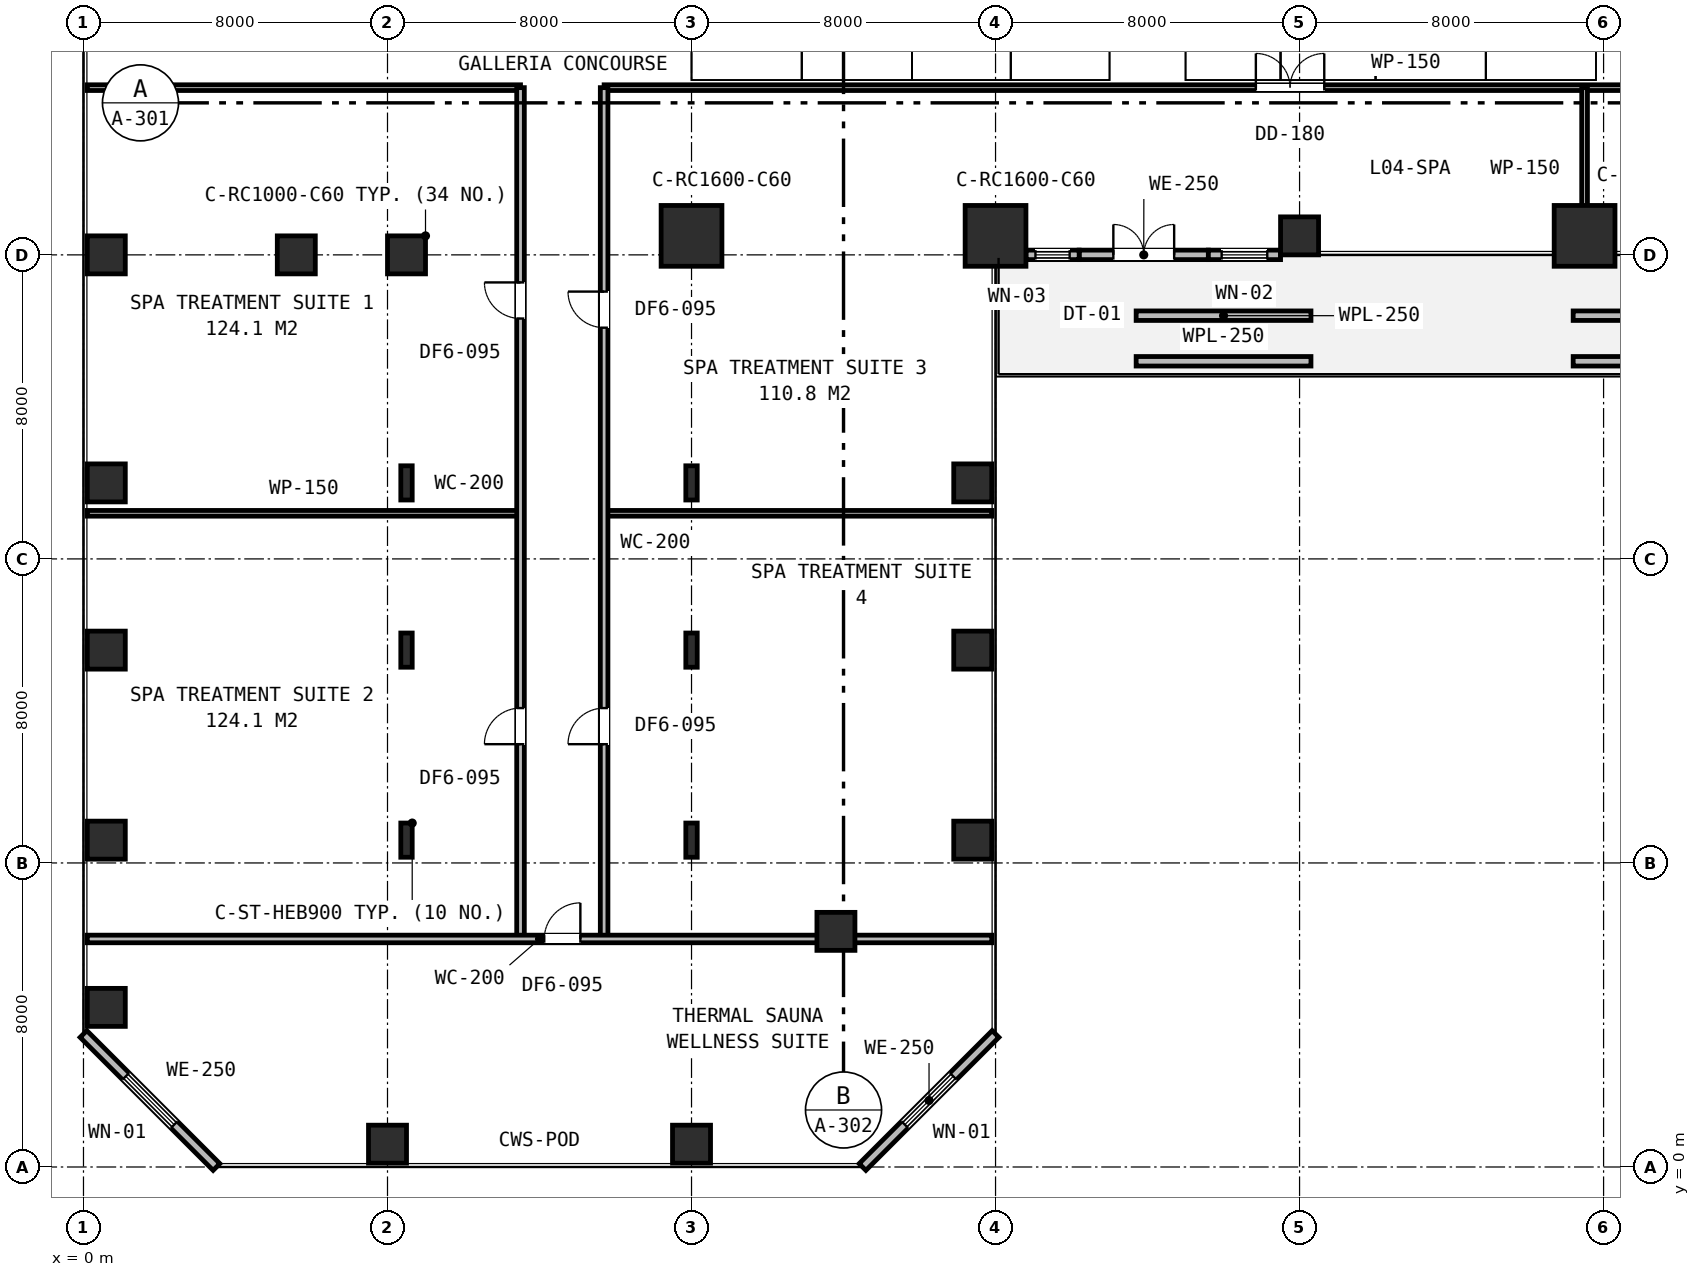
"""IFC4 building model, lengths in metres.
Left out: names, types, materials, properties, quantities, classifications, styles, units other than length and angle.
Written with IfcOpenShell. Run it as: python <this file> out.ifc"""

import sys

from ifc_helpers import new_model, si_unit, direction, frame, frame_2d, origin, origin_2d, place, context, subcontext, project, spatial, rectangle, i_section, extrude, element, fill, save


model = new_model("IFC4")
c1 = context("Model", 3, precision=1e-05, world=origin(), true_north=direction((0.0, 1.0)))
c2 = subcontext(c1, "Body", "Model", "MODEL_VIEW")
j1 = project(units=[si_unit("LENGTHUNIT", "METRE"), si_unit("PLANEANGLEUNIT", "RADIAN")], contexts=[c1])
p1 = place(None, origin())
s1 = spatial("IfcSite", under=j1, at=p1, CompositionType="ELEMENT")
p2 = place(p1, origin())
s2 = spatial("IfcBuilding", under=s1, at=p2, CompositionType="ELEMENT")
p3 = place(p2, frame((0.0, 0.0, 21.3)))
s3 = spatial("IfcBuildingStorey", under=s2, at=p3, CompositionType="ELEMENT", Elevation=21.3)
p4 = place(p3, frame((8.5, 24.0, 0.0), z_axis=(0.0, 0.0, 1.0), x_axis=(1.0, 0.0, 0.0)))
e1 = element("IfcColumn", 1, at=p4, inside=s3, PredefinedType="COLUMN", context=c2, shape_type="SweptSolid", body=[
    extrude(rectangle(XDim=1.0, YDim=1.0, at=origin_2d()), origin(), (0.0, 0.0, 1.0), 4.5),
])
for number, where, z_axis, x_axis in (
    (2, (16.0, 24.5, 0.0), (0.0, 0.0, 1.0), (1.0, 0.0, 0.0)),
    (3, (24.0, 24.5, 0.0), (0.0, 0.0, 1.0), (1.0, 0.0, 0.0)),
):
    element("IfcColumn", number, at=place(p3, frame(where, z_axis=z_axis, x_axis=x_axis)), inside=s3, PredefinedType="COLUMN", context=c2, shape_type="SweptSolid", body=[
        extrude(rectangle(XDim=1.6, YDim=1.6, at=origin_2d()), origin(), (0.0, 0.0, 1.0), 4.5),
    ])
p5 = place(p3, frame((32.0, 24.5, 0.0), z_axis=(0.0, 0.0, 1.0), x_axis=(1.0, 0.0, 0.0)))
e4 = element("IfcColumn", 4, at=p5, inside=s3, PredefinedType="COLUMN", context=c2, shape_type="SweptSolid", body=[
    extrude(rectangle(XDim=1.0, YDim=1.0, at=origin_2d()), origin(), (0.0, 0.0, 1.0), 4.5),
])
p6 = place(p3, frame((39.5, 24.5, 0.0), z_axis=(0.0, 0.0, 1.0), x_axis=(1.0, 0.0, 0.0)))
e5 = element("IfcColumn", 5, at=p6, inside=s3, PredefinedType="COLUMN", context=c2, shape_type="SweptSolid", body=[
    extrude(rectangle(XDim=1.6, YDim=1.6, at=origin_2d()), origin(), (0.0, 0.0, 1.0), 4.5),
])
for number, where, z_axis, x_axis in (
    (6, (5.6, 24.0, 0.0), (0.0, 0.0, 1.0), (1.0, 0.0, 0.0)),
    (7, (0.6, 24.0, 0.0), (0.0, 0.0, 1.0), (1.0, 0.0, 0.0)),
    (8, (0.6, 8.6, 0.0), (0.0, 0.0, 1.0), (1.0, 0.0, 0.0)),
    (9, (0.6, 13.6, 0.0), (0.0, 0.0, 1.0), (1.0, 0.0, 0.0)),
    (10, (0.6, 18.0, 0.0), (0.0, 0.0, 1.0), (1.0, 0.0, 0.0)),
    (11, (0.6, 4.2, 0.0), (0.0, 0.0, 1.0), (1.0, 0.0, 0.0)),
    (12, (8.0, 0.6, 0.0), (0.0, 0.0, 1.0), (1.0, 0.0, 0.0)),
    (13, (16.0, 0.6, 0.0), (0.0, 0.0, 1.0), (1.0, 0.0, 0.0)),
    (14, (19.8, 6.2, 0.0), (0.0, 0.0, 1.0), (1.0, 0.0, 0.0)),
    (15, (23.4, 8.6, 0.0), (0.0, 0.0, 1.0), (1.0, 0.0, 0.0)),
    (16, (23.4, 13.6, 0.0), (0.0, 0.0, 1.0), (1.0, 0.0, 0.0)),
    (17, (23.4, 18.0, 0.0), (0.0, 0.0, 1.0), (1.0, 0.0, 0.0)),
):
    element("IfcColumn", number, at=place(p3, frame(where, z_axis=z_axis, x_axis=x_axis)), inside=s3, PredefinedType="COLUMN", context=c2, shape_type="SweptSolid", body=[
        extrude(rectangle(XDim=1.0, YDim=1.0, at=origin_2d()), origin(), (0.0, 0.0, 1.0), 4.5),
    ])
for number, where, z_axis, x_axis in (
    (18, (8.5, 8.6, 0.0), (0.0, 0.0, 1.0), (1.0, 0.0, 0.0)),
    (19, (16.0, 8.6, 0.0), (0.0, 0.0, 1.0), (1.0, 0.0, 0.0)),
    (20, (8.5, 13.6, 0.0), (0.0, 0.0, 1.0), (1.0, 0.0, 0.0)),
    (21, (16.0, 13.6, 0.0), (0.0, 0.0, 1.0), (1.0, 0.0, 0.0)),
    (22, (8.5, 18.0, 0.0), (0.0, 0.0, 1.0), (1.0, 0.0, 0.0)),
    (23, (16.0, 18.0, 0.0), (0.0, 0.0, 1.0), (1.0, 0.0, 0.0)),
):
    element("IfcColumn", number, at=place(p3, frame(where, z_axis=z_axis, x_axis=x_axis)), inside=s3, PredefinedType="COLUMN", context=c2, shape_type="SweptSolid", body=[
        extrude(i_section(OverallWidth=0.3, OverallDepth=0.9, WebThickness=0.018, FlangeThickness=0.035, FilletRadius=0.03, at=origin_2d()), origin(), (0.0, 0.0, 1.0), 4.5),
    ])
for number, where, z_axis, x_axis in (
    (24, (27.7, 21.2, -0.02), (0.0, 0.0, 1.0), (1.0, 0.0, 0.0)),
    (25, (27.7, 22.4, -0.02), (0.0, 0.0, 1.0), (1.0, 0.0, 0.0)),
    (26, (39.2, 21.2, -0.02), (0.0, 0.0, 1.0), (1.0, 0.0, 0.0)),
    (27, (39.2, 22.4, -0.02), (0.0, 0.0, 1.0), (1.0, 0.0, 0.0)),
):
    element("IfcWall", number, at=place(p3, frame(where, z_axis=z_axis, x_axis=x_axis)), inside=s3, PredefinedType="USERDEFINED", context=c2, shape_type="SweptSolid", body=[
        extrude(rectangle(XDim=4.6, YDim=0.25, at=frame_2d((2.3, 0.0))), origin(), (0.0, 0.0, 1.0), 0.55),
    ])
p7 = place(p3, frame((20.5, 0.0, 0.0), z_axis=(0.0, 0.0, 1.0), x_axis=(0.707106781187, 0.707106781187, 0.0)))
e28 = element("IfcWall", 28, at=p7, inside=s3, PredefinedType="STANDARD", context=c2, shape_type="SweptSolid", body=[
    extrude(rectangle(XDim=4.95, YDim=0.25, at=frame_2d((2.475, 0.0))), origin(), (0.0, 0.0, 1.0), 4.23),
])
p8 = place(p7, frame((1.575, 0.0, 0.75)))
e29 = element("IfcOpeningElement", 29, at=p8, cuts=e28, PredefinedType="OPENING", context=c2, shape_type="SweptSolid", body=[
    extrude(rectangle(XDim=1.8, YDim=1.85, at=frame_2d((0.9, 0.925))), frame((0.0, 0.135, 0.0), z_axis=(0.0, -1.0, 0.0), x_axis=(1.0, 0.0, 0.0)), (0.0, 0.0, 1.0), 0.27),
])
p9 = place(p3, frame((26.2, 24.0, 0.0), z_axis=(0.0, 0.0, 1.0), x_axis=(1.0, 0.0, 0.0)))
e30 = element("IfcWall", 30, at=p9, inside=s3, PredefinedType="STANDARD", context=c2, shape_type="SweptSolid", body=[
    extrude(rectangle(XDim=3.4, YDim=0.25, at=frame_2d((1.7, 0.0))), origin(), (0.0, 0.0, 1.0), 3.77),
])
p10 = place(p9, frame((0.9, 0.0, 0.0)))
e31 = element("IfcOpeningElement", 31, at=p10, cuts=e30, PredefinedType="OPENING", context=c2, shape_type="SweptSolid", body=[
    extrude(rectangle(XDim=1.6, YDim=2.2, at=frame_2d((0.8, 1.1))), frame((0.0, 0.135, 0.0), z_axis=(0.0, -1.0, 0.0), x_axis=(1.0, 0.0, 0.0)), (0.0, 0.0, 1.0), 0.27),
])
p11 = place(p3, frame((24.8, 24.0, 0.0), z_axis=(0.0, 0.0, 1.0), x_axis=(1.0, 0.0, 0.0)))
e32 = element("IfcWall", 32, at=p11, inside=s3, PredefinedType="STANDARD", context=c2, shape_type="SweptSolid", body=[
    extrude(rectangle(XDim=1.4, YDim=0.25, at=frame_2d((0.7, 0.0))), origin(), (0.0, 0.0, 1.0), 3.77),
])
p12 = place(p11, frame((0.25, 0.0, 0.9)))
e33 = element("IfcOpeningElement", 33, at=p12, cuts=e32, PredefinedType="OPENING", context=c2, shape_type="SweptSolid", body=[
    extrude(rectangle(XDim=0.9, YDim=1.55, at=frame_2d((0.45, 0.775))), frame((0.0, 0.135, 0.0), z_axis=(0.0, -1.0, 0.0), x_axis=(1.0, 0.0, 0.0)), (0.0, 0.0, 1.0), 0.27),
])
p13 = place(p3, frame((29.6, 24.0, 0.0), z_axis=(0.0, 0.0, 1.0), x_axis=(1.0, 0.0, 0.0)))
e34 = element("IfcWall", 34, at=p13, inside=s3, PredefinedType="STANDARD", context=c2, shape_type="SweptSolid", body=[
    extrude(rectangle(XDim=1.9, YDim=0.25, at=frame_2d((0.95, 0.0))), origin(), (0.0, 0.0, 1.0), 3.77),
])
p14 = place(p13, frame((0.35, 0.0, 0.85)))
e35 = element("IfcOpeningElement", 35, at=p14, cuts=e34, PredefinedType="OPENING", context=c2, shape_type="SweptSolid", body=[
    extrude(rectangle(XDim=1.2, YDim=1.6, at=frame_2d((0.6, 0.8))), frame((0.0, 0.135, 0.0), z_axis=(0.0, -1.0, 0.0), x_axis=(1.0, 0.0, 0.0)), (0.0, 0.0, 1.0), 0.27),
])
p15 = place(p3, frame((0.0, 3.5, 0.0), z_axis=(0.0, 0.0, 1.0), x_axis=(0.707106781187, -0.707106781187, 0.0)))
e36 = element("IfcWall", 36, at=p15, inside=s3, PredefinedType="STANDARD", context=c2, shape_type="SweptSolid", body=[
    extrude(rectangle(XDim=4.95, YDim=0.25, at=frame_2d((2.475, 0.0))), origin(), (0.0, 0.0, 1.0), 4.23),
])
p16 = place(p15, frame((1.575, 0.0, 0.75)))
e37 = element("IfcOpeningElement", 37, at=p16, cuts=e36, PredefinedType="OPENING", context=c2, shape_type="SweptSolid", body=[
    extrude(rectangle(XDim=1.8, YDim=1.85, at=frame_2d((0.9, 0.925))), frame((0.0, 0.135, 0.0), z_axis=(0.0, -1.0, 0.0), x_axis=(1.0, 0.0, 0.0)), (0.0, 0.0, 1.0), 0.27),
])
p17 = place(p3, frame((13.7, 28.4, 0.0), z_axis=(0.0, 0.0, 1.0), x_axis=(1.0, 0.0, 0.0)))
e38 = element("IfcWall", 38, at=p17, inside=s3, PredefinedType="PARTITIONING", context=c2, shape_type="SweptSolid", body=[
    extrude(rectangle(XDim=42.2, YDim=0.15, at=frame_2d((21.1, 0.0))), origin(), (0.0, 0.0, 1.0), 3.58),
])
p18 = place(p17, frame((17.15, 0.0, 0.0)))
e39 = element("IfcOpeningElement", 39, at=p18, cuts=e38, PredefinedType="OPENING", context=c2, shape_type="SweptSolid", body=[
    extrude(rectangle(XDim=1.8, YDim=2.15, at=frame_2d((0.9, 1.075))), frame((0.0, 0.085, 0.0), z_axis=(0.0, -1.0, 0.0), x_axis=(1.0, 0.0, 0.0)), (0.0, 0.0, 1.0), 0.17),
])
p19 = place(p17, frame((33.525, 0.0, 0.0)))
e40 = element("IfcOpeningElement", 40, at=p19, cuts=e38, PredefinedType="OPENING", context=c2, shape_type="SweptSolid", body=[
    extrude(rectangle(XDim=0.95, YDim=2.15, at=frame_2d((0.475, 1.075))), frame((0.0, 0.085, 0.0), z_axis=(0.0, -1.0, 0.0), x_axis=(1.0, 0.0, 0.0)), (0.0, 0.0, 1.0), 0.17),
])
p20 = place(p3, frame((39.5, 24.1, 0.0), z_axis=(0.0, 0.0, 1.0), x_axis=(0.0, 1.0, 0.0)))
e41 = element("IfcWall", 41, at=p20, inside=s3, PredefinedType="PARTITIONING", context=c2, shape_type="SweptSolid", body=[
    extrude(rectangle(XDim=4.3, YDim=0.15, at=frame_2d((2.15, 0.0))), origin(), (0.0, 0.0, 1.0), 3.58),
])
for number, where, z_axis, x_axis in (
    (42, (0.1, 28.4, 0.0), (0.0, 0.0, 1.0), (1.0, 0.0, 0.0)),
    (43, (0.1, 17.2, 0.0), (0.0, 0.0, 1.0), (1.0, 0.0, 0.0)),
):
    element("IfcWall", number, at=place(p3, frame(where, z_axis=z_axis, x_axis=x_axis)), inside=s3, PredefinedType="PARTITIONING", context=c2, shape_type="SweptSolid", body=[
        extrude(rectangle(XDim=11.4, YDim=0.15, at=frame_2d((5.7, 0.0))), origin(), (0.0, 0.0, 1.0), 3.58),
    ])
p21 = place(p3, frame((13.7, 17.2, 0.0), z_axis=(0.0, 0.0, 1.0), x_axis=(1.0, 0.0, 0.0)))
e44 = element("IfcWall", 44, at=p21, inside=s3, PredefinedType="PARTITIONING", context=c2, shape_type="SweptSolid", body=[
    extrude(rectangle(XDim=10.2, YDim=0.15, at=frame_2d((5.1, 0.0))), origin(), (0.0, 0.0, 1.0), 3.58),
])
p22 = place(p3, frame((11.5, 6.0, 0.0), z_axis=(0.0, 0.0, 1.0), x_axis=(0.0, 1.0, 0.0)))
e45 = element("IfcWall", 45, at=p22, inside=s3, PredefinedType="PARTITIONING", context=c2, shape_type="SweptSolid", body=[
    extrude(rectangle(XDim=22.4, YDim=0.2, at=frame_2d((11.2, 0.0))), origin(), (0.0, 0.0, 1.0), 3.58),
])
p23 = place(p22, frame((16.325, 0.0, 0.0)))
e46 = element("IfcOpeningElement", 46, at=p23, cuts=e45, PredefinedType="OPENING", context=c2, shape_type="SweptSolid", body=[
    extrude(rectangle(XDim=0.95, YDim=2.15, at=frame_2d((0.475, 1.075))), frame((0.0, 0.11, 0.0), z_axis=(0.0, -1.0, 0.0), x_axis=(1.0, 0.0, 0.0)), (0.0, 0.0, 1.0), 0.22),
])
p24 = place(p22, frame((5.125, 0.0, 0.0)))
e47 = element("IfcOpeningElement", 47, at=p24, cuts=e45, PredefinedType="OPENING", context=c2, shape_type="SweptSolid", body=[
    extrude(rectangle(XDim=0.95, YDim=2.15, at=frame_2d((0.475, 1.075))), frame((0.0, 0.11, 0.0), z_axis=(0.0, -1.0, 0.0), x_axis=(1.0, 0.0, 0.0)), (0.0, 0.0, 1.0), 0.22),
])
p25 = place(p3, frame((13.7, 6.0, 0.0), z_axis=(0.0, 0.0, 1.0), x_axis=(0.0, 1.0, 0.0)))
e48 = element("IfcWall", 48, at=p25, inside=s3, PredefinedType="PARTITIONING", context=c2, shape_type="SweptSolid", body=[
    extrude(rectangle(XDim=22.4, YDim=0.2, at=frame_2d((11.2, 0.0))), origin(), (0.0, 0.0, 1.0), 3.58),
])
p26 = place(p25, frame((16.084, 0.0, 0.0)))
e49 = element("IfcOpeningElement", 49, at=p26, cuts=e48, PredefinedType="OPENING", context=c2, shape_type="SweptSolid", body=[
    extrude(rectangle(XDim=0.95, YDim=2.15, at=frame_2d((0.475, 1.075))), frame((0.0, 0.11, 0.0), z_axis=(0.0, -1.0, 0.0), x_axis=(1.0, 0.0, 0.0)), (0.0, 0.0, 1.0), 0.22),
])
p27 = place(p25, frame((5.125, 0.0, 0.0)))
e50 = element("IfcOpeningElement", 50, at=p27, cuts=e48, PredefinedType="OPENING", context=c2, shape_type="SweptSolid", body=[
    extrude(rectangle(XDim=0.95, YDim=2.15, at=frame_2d((0.475, 1.075))), frame((0.0, 0.11, 0.0), z_axis=(0.0, -1.0, 0.0), x_axis=(1.0, 0.0, 0.0)), (0.0, 0.0, 1.0), 0.22),
])
p28 = place(p3, frame((0.1, 6.0, 0.0), z_axis=(0.0, 0.0, 1.0), x_axis=(1.0, 0.0, 0.0)))
e51 = element("IfcWall", 51, at=p28, inside=s3, PredefinedType="PARTITIONING", context=c2, shape_type="SweptSolid", body=[
    extrude(rectangle(XDim=23.8, YDim=0.2, at=frame_2d((11.9, 0.0))), origin(), (0.0, 0.0, 1.0), 3.58),
])
p29 = place(p28, frame((12.025, 0.0, 0.0)))
e52 = element("IfcOpeningElement", 52, at=p29, cuts=e51, PredefinedType="OPENING", context=c2, shape_type="SweptSolid", body=[
    extrude(rectangle(XDim=0.95, YDim=2.15, at=frame_2d((0.475, 1.075))), frame((0.0, 0.11, 0.0), z_axis=(0.0, -1.0, 0.0), x_axis=(1.0, 0.0, 0.0)), (0.0, 0.0, 1.0), 0.22),
])
p30 = place(p8, origin())
e53 = element("IfcWindow", 53, at=p30, inside=s3, PartitioningType="SINGLE_PANEL", PredefinedType="WINDOW", context=c2, shape_type="SweptSolid", body=[
    extrude(rectangle(XDim=1.8, YDim=1.85, at=frame_2d((0.9, 0.925))), frame((0.0, 0.03, 0.0), z_axis=(0.0, -1.0, 0.0), x_axis=(1.0, 0.0, 0.0)), (0.0, 0.0, 1.0), 0.06),
])
fill(e29, e53)
p31 = place(p10, origin())
e54 = element("IfcDoor", 54, at=p31, inside=s3, OperationType="DOUBLE_DOOR_SINGLE_SWING", PredefinedType="DOOR", context=c2, shape_type="SweptSolid", body=[
    extrude(rectangle(XDim=1.6, YDim=2.2, at=frame_2d((0.8, 1.1))), frame((0.0, 0.025, 0.0), z_axis=(0.0, -1.0, 0.0), x_axis=(1.0, 0.0, 0.0)), (0.0, 0.0, 1.0), 0.05),
])
fill(e31, e54)
p32 = place(p12, origin())
e55 = element("IfcWindow", 55, at=p32, inside=s3, PartitioningType="SINGLE_PANEL", PredefinedType="WINDOW", context=c2, shape_type="SweptSolid", body=[
    extrude(rectangle(XDim=0.9, YDim=1.55, at=frame_2d((0.45, 0.775))), frame((0.0, 0.03, 0.0), z_axis=(0.0, -1.0, 0.0), x_axis=(1.0, 0.0, 0.0)), (0.0, 0.0, 1.0), 0.06),
])
fill(e33, e55)
p33 = place(p14, origin())
e56 = element("IfcWindow", 56, at=p33, inside=s3, PartitioningType="SINGLE_PANEL", PredefinedType="WINDOW", context=c2, shape_type="SweptSolid", body=[
    extrude(rectangle(XDim=1.2, YDim=1.6, at=frame_2d((0.6, 0.8))), frame((0.0, 0.03, 0.0), z_axis=(0.0, -1.0, 0.0), x_axis=(1.0, 0.0, 0.0)), (0.0, 0.0, 1.0), 0.06),
])
fill(e35, e56)
p34 = place(p16, origin())
e57 = element("IfcWindow", 57, at=p34, inside=s3, PartitioningType="SINGLE_PANEL", PredefinedType="WINDOW", context=c2, shape_type="SweptSolid", body=[
    extrude(rectangle(XDim=1.8, YDim=1.85, at=frame_2d((0.9, 0.925))), frame((0.0, 0.03, 0.0), z_axis=(0.0, -1.0, 0.0), x_axis=(1.0, 0.0, 0.0)), (0.0, 0.0, 1.0), 0.06),
])
fill(e37, e57)
p35 = place(p18, origin())
e58 = element("IfcDoor", 58, at=p35, inside=s3, OperationType="DOUBLE_DOOR_SINGLE_SWING", PredefinedType="DOOR", context=c2, shape_type="SweptSolid", body=[
    extrude(rectangle(XDim=1.8, YDim=2.15, at=frame_2d((0.9, 1.075))), frame((0.0, 0.025, 0.0), z_axis=(0.0, -1.0, 0.0), x_axis=(1.0, 0.0, 0.0)), (0.0, 0.0, 1.0), 0.05),
])
fill(e39, e58)
p36 = place(p23, origin())
e59 = element("IfcDoor", 59, at=p36, inside=s3, OperationType="SINGLE_SWING_RIGHT", PredefinedType="DOOR", context=c2, shape_type="SweptSolid", body=[
    extrude(rectangle(XDim=0.95, YDim=2.15, at=frame_2d((0.475, 1.075))), frame((0.0, 0.025, 0.0), z_axis=(0.0, -1.0, 0.0), x_axis=(1.0, 0.0, 0.0)), (0.0, 0.0, 1.0), 0.05),
])
fill(e46, e59)
p37 = place(p24, origin())
e60 = element("IfcDoor", 60, at=p37, inside=s3, OperationType="SINGLE_SWING_LEFT", PredefinedType="DOOR", context=c2, shape_type="SweptSolid", body=[
    extrude(rectangle(XDim=0.95, YDim=2.15, at=frame_2d((0.475, 1.075))), frame((0.0, 0.025, 0.0), z_axis=(0.0, -1.0, 0.0), x_axis=(1.0, 0.0, 0.0)), (0.0, 0.0, 1.0), 0.05),
])
fill(e47, e60)
p38 = place(p26, origin())
e61 = element("IfcDoor", 61, at=p38, inside=s3, OperationType="SINGLE_SWING_RIGHT", PredefinedType="DOOR", context=c2, shape_type="SweptSolid", body=[
    extrude(rectangle(XDim=0.95, YDim=2.15, at=frame_2d((0.475, 1.075))), frame((0.0, 0.025, 0.0), z_axis=(0.0, -1.0, 0.0), x_axis=(1.0, 0.0, 0.0)), (0.0, 0.0, 1.0), 0.05),
])
fill(e49, e61)
p39 = place(p27, origin())
e62 = element("IfcDoor", 62, at=p39, inside=s3, OperationType="SINGLE_SWING_LEFT", PredefinedType="DOOR", context=c2, shape_type="SweptSolid", body=[
    extrude(rectangle(XDim=0.95, YDim=2.15, at=frame_2d((0.475, 1.075))), frame((0.0, 0.025, 0.0), z_axis=(0.0, -1.0, 0.0), x_axis=(1.0, 0.0, 0.0)), (0.0, 0.0, 1.0), 0.05),
])
fill(e50, e62)
p40 = place(p29, origin())
e63 = element("IfcDoor", 63, at=p40, inside=s3, OperationType="SINGLE_SWING_RIGHT", PredefinedType="DOOR", context=c2, shape_type="SweptSolid", body=[
    extrude(rectangle(XDim=0.95, YDim=2.15, at=frame_2d((0.475, 1.075))), frame((0.0, 0.025, 0.0), z_axis=(0.0, -1.0, 0.0), x_axis=(1.0, 0.0, 0.0)), (0.0, 0.0, 1.0), 0.05),
])
fill(e52, e63)
save(model, sys.argv[1])
